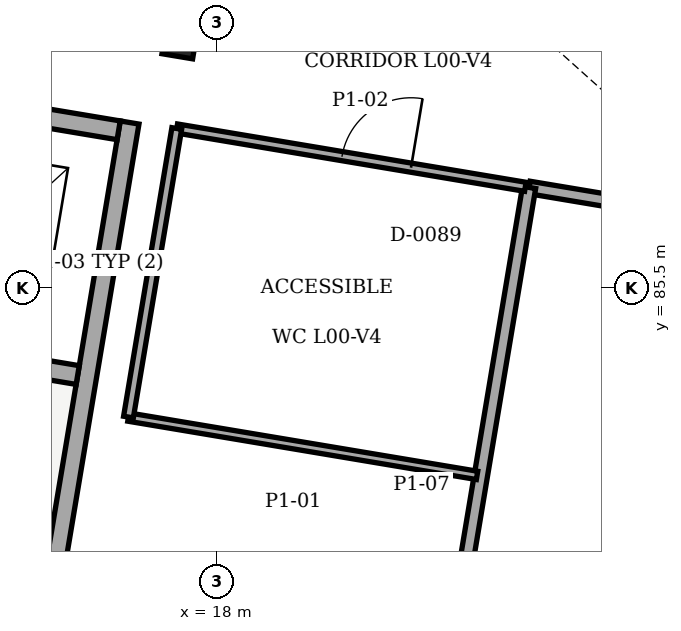
"""IFC4 building model, lengths in metres.
Left out: names, types, materials, properties, quantities, classifications, styles, units other than length and angle.
Written with IfcOpenShell. Run it as: python <this file> out.ifc"""

import sys

from ifc_helpers import new_model, si_unit, direction, frame, frame_2d, origin, origin_with_axes, origin_2d, place, context, subcontext, project, spatial, rectangle, i_section, extrude, element, fill, save


model = new_model("IFC4")
c1 = context("Model", 3, precision=1e-05, world=origin(), true_north=direction((0.0, 1.0)))
c2 = subcontext(c1, "Body", "Model", "MODEL_VIEW")
j1 = project(units=[si_unit("LENGTHUNIT", "METRE"), si_unit("PLANEANGLEUNIT", "RADIAN")], contexts=[c1])
p1 = place(None, origin())
s1 = spatial("IfcSite", under=j1, at=p1, CompositionType="ELEMENT")
p2 = place(p1, origin())
s2 = spatial("IfcBuilding", under=s1, at=p2, CompositionType="ELEMENT")
p3 = place(p2, origin())
s3 = spatial("IfcBuildingStorey", under=s2, at=p3, CompositionType="ELEMENT", Elevation=0.0)
p4 = place(p3, frame((17.512, 88.754, 0.0), z_axis=(0.0, 0.0, 1.0), x_axis=(0.986285601537, -0.165047605861, 0.0)))
e1 = element("IfcColumn", 1, at=p4, inside=s3, PredefinedType="COLUMN", context=c2, shape_type="SweptSolid", body=[
    extrude(i_section(OverallWidth=0.409, OverallDepth=0.424, WebThickness=0.033, FlangeThickness=0.052, FilletRadius=0.015, at=origin_2d()), origin(), (0.0, 0.0, 1.0), 4.8),
])
p5 = place(p3, frame((15.549, 79.897, 0.0), z_axis=(0.0, 0.0, 1.0), x_axis=(0.16506171759, 0.98628323994, 0.0)))
e2 = element("IfcWall", 2, at=p5, inside=s3, PredefinedType="SHEAR", context=c2, shape_type="SweptSolid", body=[
    extrude(rectangle(XDim=7.885, YDim=0.25, at=frame_2d((3.942, 0.0))), origin(), (0.0, 0.0, 1.0), 4.54),
])
p6 = place(p3, frame((8.721, 85.597, 0.0), z_axis=(0.0, 0.0, 1.0), x_axis=(0.986286216974, -0.165043928115, 0.0)))
e3 = element("IfcWall", 3, at=p6, inside=s3, PredefinedType="SHEAR", context=c2, shape_type="SweptSolid", body=[
    extrude(rectangle(XDim=7.55, YDim=0.25, at=frame_2d((3.775, 0.0))), origin(), (0.0, 0.0, 1.0), 4.54),
])
p7 = place(p6, frame((0.45, 0.0, 0.0)))
e4 = element("IfcOpeningElement", 4, at=p7, cuts=e3, PredefinedType="OPENING", context=c2, shape_type="SweptSolid", body=[
    extrude(rectangle(XDim=1.1, YDim=2.15, at=frame_2d((0.55, 1.075))), frame((0.0, 0.135, 0.0), z_axis=(0.0, -1.0, 0.0), x_axis=(1.0, 0.0, 0.0)), (0.0, 0.0, 1.0), 0.27),
])
p8 = place(p3, frame((9.26, 88.817, 0.0), z_axis=(0.0, 0.0, 1.0), x_axis=(0.98628533611, -0.165049191984, 0.0)))
e5 = element("IfcWall", 5, at=p8, inside=s3, PredefinedType="SHEAR", context=c2, shape_type="SweptSolid", body=[
    extrude(rectangle(XDim=7.55, YDim=0.25, at=frame_2d((3.775, 0.0))), origin(), (0.0, 0.0, 1.0), 4.54),
])
p9 = place(p8, frame((1.45, 0.0, 0.0)))
e6 = element("IfcOpeningElement", 6, at=p9, cuts=e5, PredefinedType="OPENING", context=c2, shape_type="SweptSolid", body=[
    extrude(rectangle(XDim=1.3, YDim=2.15, at=frame_2d((0.65, 1.075))), frame((0.0, 0.135, 0.0), z_axis=(0.0, -1.0, 0.0), x_axis=(1.0, 0.0, 0.0)), (0.0, 0.0, 1.0), 0.27),
])
p10 = place(p3, frame((22.106, 86.819, 0.0), z_axis=(0.0, 0.0, 1.0), x_axis=(0.986284147331, -0.165056295617, 0.0)))
e7 = element("IfcWall", 7, at=p10, inside=s3, PredefinedType="PARTITIONING", context=c2, shape_type="SweptSolid", body=[
    extrude(rectangle(XDim=13.25, YDim=0.165, at=frame_2d((6.625, 0.0))), origin(), (0.0, 0.0, 1.0), 3.38),
])
p11 = place(p10, frame((7.177, 0.0, 0.0)))
e8 = element("IfcOpeningElement", 8, at=p11, cuts=e7, PredefinedType="OPENING", context=c2, shape_type="SweptSolid", body=[
    extrude(rectangle(XDim=1.5, YDim=2.2, at=frame_2d((0.75, 1.1))), frame((0.0, 0.093, 0.0), z_axis=(0.0, -1.0, 0.0), x_axis=(1.0, 0.0, 0.0)), (0.0, 0.0, 1.0), 0.185),
])
p12 = place(p3, frame((20.756, 78.751, 0.0), z_axis=(0.0, 0.0, 1.0), x_axis=(0.165047493803, 0.986285620289, 0.0)))
e9 = element("IfcWall", 9, at=p12, inside=s3, PredefinedType="PARTITIONING", context=c2, shape_type="SweptSolid", body=[
    extrude(rectangle(XDim=8.18, YDim=0.175, at=frame_2d((4.09, 0.0))), origin(), (0.0, 0.0, 1.0), 3.38),
])
p13 = place(p3, frame((21.421, 83.03, 0.0), z_axis=(0.0, 0.0, 1.0), x_axis=(-0.986281592059, 0.165071563771, 0.0)))
e10 = element("IfcWall", 10, at=p13, inside=s3, PredefinedType="PARTITIONING", context=c2, shape_type="SweptSolid", body=[
    extrude(rectangle(XDim=4.65, YDim=0.11, at=frame_2d((2.325, 0.0))), origin(), (0.0, 0.0, 1.0), 3.38),
])
p14 = place(p3, frame((17.471, 87.595, 0.0), z_axis=(0.0, 0.0, 1.0), x_axis=(0.986290138779, -0.165020490082, 0.0)))
e11 = element("IfcWall", 11, at=p14, inside=s3, PredefinedType="PARTITIONING", context=c2, shape_type="SweptSolid", body=[
    extrude(rectangle(XDim=4.65, YDim=0.12, at=frame_2d((2.325, 0.0))), origin(), (0.0, 0.0, 1.0), 3.38),
])
p15 = place(p14, frame((2.205, 0.0, 0.0)))
e12 = element("IfcOpeningElement", 12, at=p15, cuts=e11, PredefinedType="OPENING", context=c2, shape_type="SweptSolid", body=[
    extrude(rectangle(XDim=0.92, YDim=2.12, at=frame_2d((0.46, 1.06))), frame((0.0, 0.07, 0.0), z_axis=(0.0, -1.0, 0.0), x_axis=(1.0, 0.0, 0.0)), (0.0, 0.0, 1.0), 0.14),
])
p16 = place(p3, frame((16.835, 83.798, 0.0), z_axis=(0.0, 0.0, 1.0), x_axis=(0.165067370347, 0.986282293893, 0.0)))
e13 = element("IfcWall", 13, at=p16, inside=s3, PredefinedType="PARTITIONING", context=c2, shape_type="SweptSolid", body=[
    extrude(rectangle(XDim=3.85, YDim=0.13, at=frame_2d((1.925, 0.0))), origin(), (0.0, 0.0, 1.0), 3.38),
])
p17 = place(p15, origin_with_axes())
e14 = element("IfcDoor", 14, at=p17, inside=s3, OperationType="SINGLE_SWING_RIGHT", PredefinedType="DOOR", context=c2, shape_type="SweptSolid", body=[
    extrude(rectangle(XDim=0.92, YDim=2.12, at=frame_2d((0.46, 1.06))), frame((0.0, 0.025, 0.0), z_axis=(0.0, -1.0, 0.0), x_axis=(1.0, 0.0, 0.0)), (0.0, 0.0, 1.0), 0.05),
])
fill(e12, e14)
save(model, sys.argv[1])
